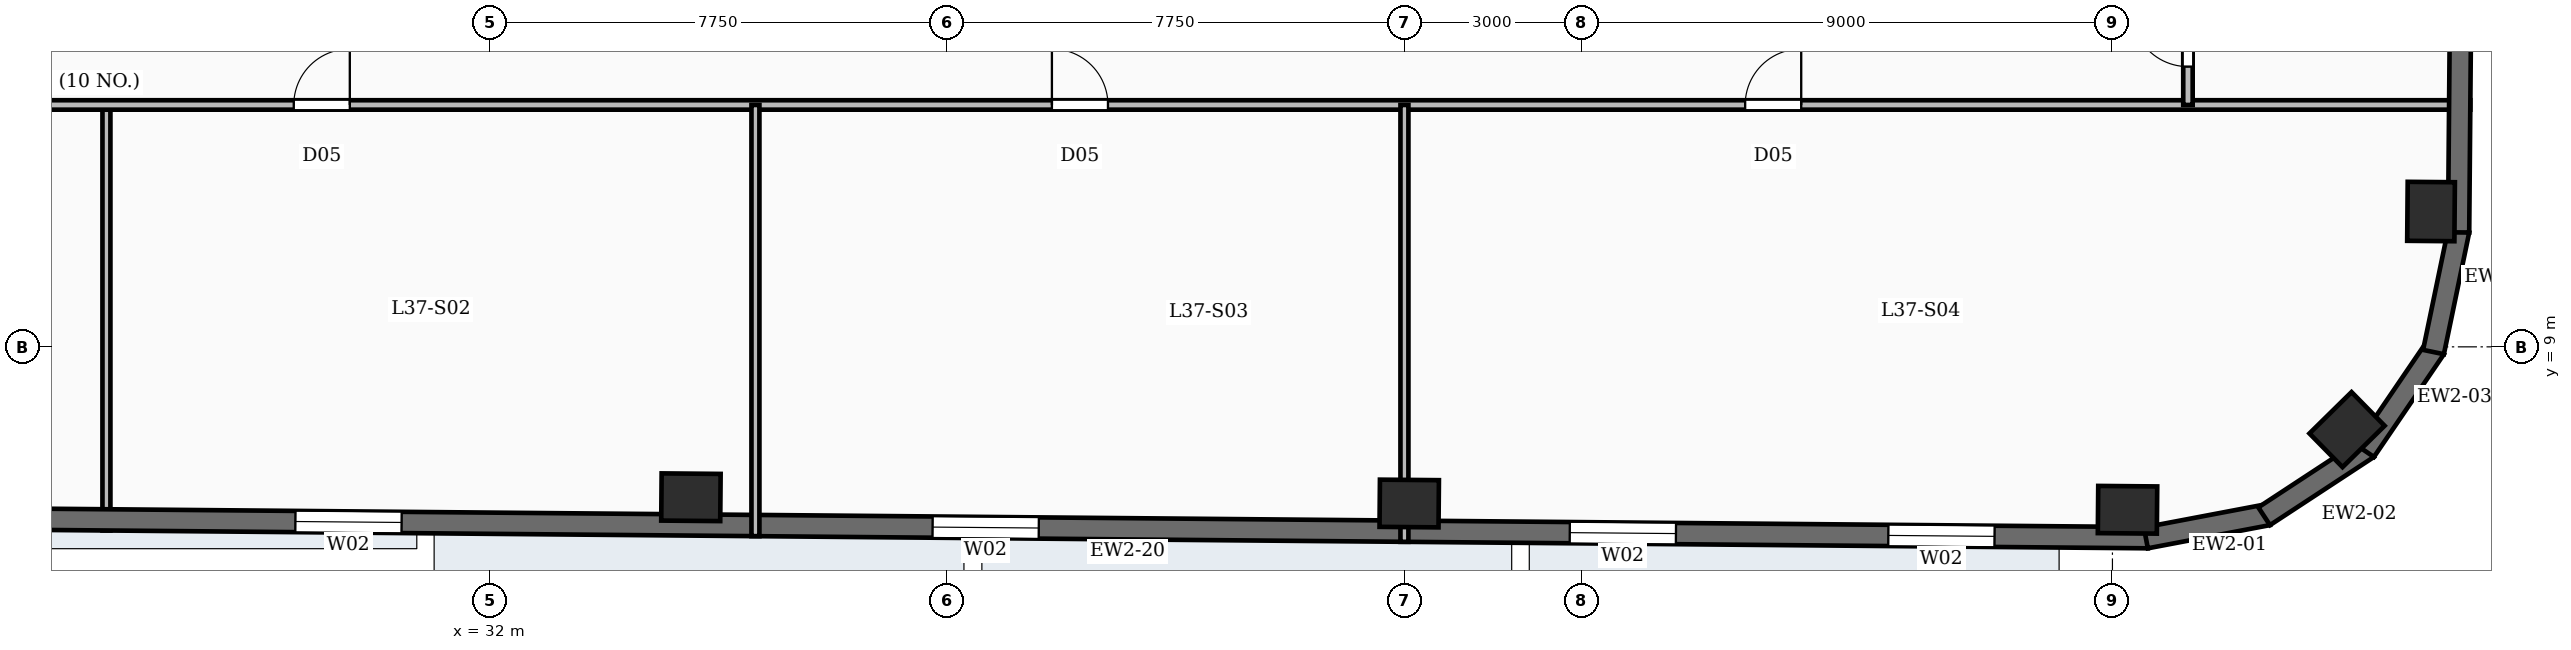
"""IFC4 building model, lengths in metres.
Left out: names, types, materials, properties, quantities, classifications, styles, units other than length and angle.
Written with IfcOpenShell. Run it as: python <this file> out.ifc"""

import sys

from ifc_helpers import new_model, si_unit, direction, frame, frame_2d, origin, origin_2d, place, context, subcontext, project, spatial, rectangle, extrude, element, fill, save


model = new_model("IFC4")
c1 = context("Model", 3, precision=1e-05, world=origin(), true_north=direction((0.0, 1.0)))
c2 = subcontext(c1, "Body", "Model", "MODEL_VIEW")
j1 = project(units=[si_unit("LENGTHUNIT", "METRE"), si_unit("PLANEANGLEUNIT", "RADIAN")], contexts=[c1])
p1 = place(None, origin())
s1 = spatial("IfcSite", under=j1, at=p1, CompositionType="ELEMENT")
p2 = place(p1, origin())
s2 = spatial("IfcBuilding", under=s1, at=p2, CompositionType="ELEMENT")
p3 = place(p2, frame((0.0, 0.0, 158.45)))
s3 = spatial("IfcBuildingStorey", under=s2, at=p3, CompositionType="ELEMENT", Elevation=158.45)
for number, where, z_axis, x_axis in (
    (1, (35.407, 6.451, -0.45), (0.0, 0.0, 1.0), (1.0, -0.009, 0.0)),
    (2, (47.581, 6.344, -0.45), (0.0, 0.0, 1.0), (1.0, -0.009, 0.0)),
    (3, (59.756, 6.238, -0.45), (0.0, 0.0, 1.0), (1.0, -0.009, 0.0)),
    (4, (63.477, 7.597, -0.45), (0.0, 0.0, 1.0), (0.713, 0.701, 0.0)),
    (5, (64.9, 11.294, -0.45), (0.0, 0.0, 1.0), (0.009, 1.0, 0.0)),
):
    element("IfcColumn", number, at=place(p3, frame(where, z_axis=z_axis, x_axis=x_axis)), inside=s3, PredefinedType="COLUMN", context=c2, shape_type="SweptSolid", body=[
        extrude(rectangle(XDim=1.0, YDim=0.8, at=origin_2d()), origin(), (0.0, 0.0, 1.0), 3.93),
    ])
p4 = place(p3, frame((62.136, 6.155, 0.0), z_axis=(0.0, 0.0, 1.0), x_axis=(-0.98246713518, -0.186435855703, 0.0)))
e6 = element("IfcWall", 6, at=p4, inside=s3, PredefinedType="SOLIDWALL", context=c2, shape_type="SweptSolid", body=[
    extrude(rectangle(XDim=2.107, YDim=0.36, at=frame_2d((1.053, 0.0))), origin(), (0.0, 0.0, 1.0), 3.48),
])
p5 = place(p3, frame((63.833, 7.284, 0.0), z_axis=(0.0, 0.0, 1.0), x_axis=(-0.836303589916, -0.548266637224, 0.0)))
e7 = element("IfcWall", 7, at=p5, inside=s3, PredefinedType="SOLIDWALL", context=c2, shape_type="SweptSolid", body=[
    extrude(rectangle(XDim=2.107, YDim=0.36, at=frame_2d((1.054, 0.0))), origin(), (0.0, 0.0, 1.0), 3.48),
])
for number, where, z_axis, x_axis in (
    (8, (64.969, 8.977, 0.0), (0.0, 0.0, 1.0), (-0.563, -0.827, 0.0)),
    (9, (65.371, 10.975, 0.0), (0.0, 0.0, 1.0), (-0.204, -0.979, 0.0)),
):
    element("IfcWall", number, at=place(p3, frame(where, z_axis=z_axis, x_axis=x_axis)), inside=s3, PredefinedType="SOLIDWALL", context=c2, shape_type="SweptSolid", body=[
        extrude(rectangle(XDim=2.107, YDim=0.36, at=frame_2d((1.053, 0.0))), origin(), (0.0, 0.0, 1.0), 3.48),
    ])
p6 = place(p3, frame((65.671, 45.738, 0.0), z_axis=(0.0, 0.0, 1.0), x_axis=(-0.008727348535, -0.999961915969, 0.0)))
e10 = element("IfcWall", 10, at=p6, inside=s3, PredefinedType="SOLIDWALL", context=c2, shape_type="SweptSolid", body=[
    extrude(rectangle(XDim=34.8, YDim=0.36, at=frame_2d((17.4, 0.0))), origin(), (0.0, 0.0, 1.0), 3.48),
])
p7 = place(p6, frame((4.2, 0.0, 0.88)))
e11 = element("IfcOpeningElement", 11, at=p7, cuts=e10, PredefinedType="OPENING", context=c2, shape_type="SweptSolid", body=[
    extrude(rectangle(XDim=1.35, YDim=2.2, at=frame_2d((0.675, 1.1))), frame((0.0, 0.19, 0.0), z_axis=(0.0, -1.0, 0.0), x_axis=(1.0, 0.0, 0.0)), (0.0, 0.0, 1.0), 0.38),
])
p8 = place(p6, frame((15.4, 0.0, 0.88)))
e12 = element("IfcOpeningElement", 12, at=p8, cuts=e10, PredefinedType="OPENING", context=c2, shape_type="SweptSolid", body=[
    extrude(rectangle(XDim=1.35, YDim=2.2, at=frame_2d((0.675, 1.1))), frame((0.0, 0.19, 0.0), z_axis=(0.0, -1.0, 0.0), x_axis=(1.0, 0.0, 0.0)), (0.0, 0.0, 1.0), 0.38),
])
p9 = place(p6, frame((26.6, 0.0, 0.88)))
e13 = element("IfcOpeningElement", 13, at=p9, cuts=e10, PredefinedType="OPENING", context=c2, shape_type="SweptSolid", body=[
    extrude(rectangle(XDim=1.35, YDim=2.2, at=frame_2d((0.675, 1.1))), frame((0.0, 0.19, 0.0), z_axis=(0.0, -1.0, 0.0), x_axis=(1.0, 0.0, 0.0)), (0.0, 0.0, 1.0), 0.38),
])
p10 = place(p3, frame((60.102, 5.765, 0.0), z_axis=(0.0, 0.0, 1.0), x_axis=(-0.999961955436, 0.008722825272, 0.0)))
e14 = element("IfcWall", 14, at=p10, inside=s3, PredefinedType="SOLIDWALL", context=c2, shape_type="SweptSolid", body=[
    extrude(rectangle(XDim=49.4, YDim=0.36, at=frame_2d((24.7, 0.0))), origin(), (0.0, 0.0, 1.0), 3.48),
])
p11 = place(p10, frame((2.6, 0.0, 0.88)))
e15 = element("IfcOpeningElement", 15, at=p11, cuts=e14, PredefinedType="OPENING", context=c2, shape_type="SweptSolid", body=[
    extrude(rectangle(XDim=1.8, YDim=2.15, at=frame_2d((0.9, 1.075))), frame((0.0, 0.19, 0.0), z_axis=(0.0, -1.0, 0.0), x_axis=(1.0, 0.0, 0.0)), (0.0, 0.0, 1.0), 0.38),
])
p12 = place(p10, frame((8.0, 0.0, 0.88)))
e16 = element("IfcOpeningElement", 16, at=p12, cuts=e14, PredefinedType="OPENING", context=c2, shape_type="SweptSolid", body=[
    extrude(rectangle(XDim=1.8, YDim=2.15, at=frame_2d((0.9, 1.075))), frame((0.0, 0.19, 0.0), z_axis=(0.0, -1.0, 0.0), x_axis=(1.0, 0.0, 0.0)), (0.0, 0.0, 1.0), 0.38),
])
p13 = place(p10, frame((18.8, 0.0, 0.88)))
e17 = element("IfcOpeningElement", 17, at=p13, cuts=e14, PredefinedType="OPENING", context=c2, shape_type="SweptSolid", body=[
    extrude(rectangle(XDim=1.8, YDim=2.15, at=frame_2d((0.9, 1.075))), frame((0.0, 0.19, 0.0), z_axis=(0.0, -1.0, 0.0), x_axis=(1.0, 0.0, 0.0)), (0.0, 0.0, 1.0), 0.38),
])
p14 = place(p10, frame((29.6, 0.0, 0.88)))
e18 = element("IfcOpeningElement", 18, at=p14, cuts=e14, PredefinedType="OPENING", context=c2, shape_type="SweptSolid", body=[
    extrude(rectangle(XDim=1.8, YDim=2.15, at=frame_2d((0.9, 1.075))), frame((0.0, 0.19, 0.0), z_axis=(0.0, -1.0, 0.0), x_axis=(1.0, 0.0, 0.0)), (0.0, 0.0, 1.0), 0.38),
])
p15 = place(p10, frame((40.4, 0.0, 0.88)))
e19 = element("IfcOpeningElement", 19, at=p15, cuts=e14, PredefinedType="OPENING", context=c2, shape_type="SweptSolid", body=[
    extrude(rectangle(XDim=1.8, YDim=2.15, at=frame_2d((0.9, 1.075))), frame((0.0, 0.19, 0.0), z_axis=(0.0, -1.0, 0.0), x_axis=(1.0, 0.0, 0.0)), (0.0, 0.0, 1.0), 0.38),
])
p16 = place(p3, frame((25.5, 5.887, 0.0), z_axis=(0.0, 0.0, 1.0), x_axis=(0.0, 1.0, 0.0)))
e20 = element("IfcWall", 20, at=p16, inside=s3, PredefinedType="PARTITIONING", context=c2, shape_type="SweptSolid", body=[
    extrude(rectangle(XDim=7.213, YDim=0.135, at=frame_2d((3.606, 0.0))), origin(), (0.0, 0.0, 1.0), 2.54),
])
p17 = place(p3, frame((36.5, 5.791, 0.0), z_axis=(0.0, 0.0, 1.0), x_axis=(0.0, 1.0, 0.0)))
e21 = element("IfcWall", 21, at=p17, inside=s3, PredefinedType="PARTITIONING", context=c2, shape_type="SweptSolid", body=[
    extrude(rectangle(XDim=7.309, YDim=0.135, at=frame_2d((3.654, 0.0))), origin(), (0.0, 0.0, 1.0), 2.54),
])
p18 = place(p3, frame((47.5, 5.695, 0.0), z_axis=(0.0, 0.0, 1.0), x_axis=(0.0, 1.0, 0.0)))
e22 = element("IfcWall", 22, at=p18, inside=s3, PredefinedType="PARTITIONING", context=c2, shape_type="SweptSolid", body=[
    extrude(rectangle(XDim=7.405, YDim=0.135, at=frame_2d((3.702, 0.0))), origin(), (0.0, 0.0, 1.0), 2.54),
])
p19 = place(p3, frame((5.364, 13.1, 0.0), z_axis=(0.0, 0.0, 1.0), x_axis=(1.0, 0.0, 0.0)))
e23 = element("IfcWall", 23, at=p19, inside=s3, PredefinedType="PARTITIONING", context=c2, shape_type="SweptSolid", body=[
    extrude(rectangle(XDim=60.202, YDim=0.16, at=frame_2d((30.101, 0.0))), origin(), (0.0, 0.0, 1.0), 2.54),
])
p20 = place(p19, frame((14.361, 0.0, 0.0)))
e24 = element("IfcOpeningElement", 24, at=p20, cuts=e23, PredefinedType="OPENING", context=c2, shape_type="SweptSolid", body=[
    extrude(rectangle(XDim=0.95, YDim=2.15, at=frame_2d((0.475, 1.075))), frame((0.0, 0.09, 0.0), z_axis=(0.0, -1.0, 0.0), x_axis=(1.0, 0.0, 0.0)), (0.0, 0.0, 1.0), 0.18),
])
p21 = place(p19, frame((23.311, 0.0, 0.0)))
e25 = element("IfcOpeningElement", 25, at=p21, cuts=e23, PredefinedType="OPENING", context=c2, shape_type="SweptSolid", body=[
    extrude(rectangle(XDim=0.95, YDim=2.15, at=frame_2d((0.475, 1.075))), frame((0.0, 0.09, 0.0), z_axis=(0.0, -1.0, 0.0), x_axis=(1.0, 0.0, 0.0)), (0.0, 0.0, 1.0), 0.18),
])
p22 = place(p19, frame((36.161, 0.0, 0.0)))
e26 = element("IfcOpeningElement", 26, at=p22, cuts=e23, PredefinedType="OPENING", context=c2, shape_type="SweptSolid", body=[
    extrude(rectangle(XDim=0.95, YDim=2.15, at=frame_2d((0.475, 1.075))), frame((0.0, 0.09, 0.0), z_axis=(0.0, -1.0, 0.0), x_axis=(1.0, 0.0, 0.0)), (0.0, 0.0, 1.0), 0.18),
])
p23 = place(p19, frame((47.911, 0.0, 0.0)))
e27 = element("IfcOpeningElement", 27, at=p23, cuts=e23, PredefinedType="OPENING", context=c2, shape_type="SweptSolid", body=[
    extrude(rectangle(XDim=0.95, YDim=2.15, at=frame_2d((0.475, 1.075))), frame((0.0, 0.09, 0.0), z_axis=(0.0, -1.0, 0.0), x_axis=(1.0, 0.0, 0.0)), (0.0, 0.0, 1.0), 0.18),
])
p24 = place(p3, frame((60.78, 13.1, 0.0), z_axis=(0.0, 0.0, 1.0), x_axis=(0.0, 1.0, 0.0)))
e28 = element("IfcWall", 28, at=p24, inside=s3, PredefinedType="PARTITIONING", context=c2, shape_type="SweptSolid", body=[
    extrude(rectangle(XDim=2.3, YDim=0.16, at=frame_2d((1.15, 0.0))), origin(), (0.0, 0.0, 1.0), 2.54),
])
p25 = place(p24, frame((0.65, 0.0, 0.0)))
e29 = element("IfcOpeningElement", 29, at=p25, cuts=e28, PredefinedType="OPENING", context=c2, shape_type="SweptSolid", body=[
    extrude(rectangle(XDim=0.95, YDim=2.15, at=frame_2d((0.475, 1.075))), frame((0.0, 0.09, 0.0), z_axis=(0.0, -1.0, 0.0), x_axis=(1.0, 0.0, 0.0)), (0.0, 0.0, 1.0), 0.18),
])
p26 = place(p11, origin())
e30 = element("IfcWindow", 30, at=p26, inside=s3, PartitioningType="DOUBLE_PANEL_VERTICAL", PredefinedType="WINDOW", context=c2, shape_type="SweptSolid", body=[
    extrude(rectangle(XDim=1.8, YDim=2.15, at=frame_2d((0.9, 1.075))), frame((0.0, 0.03, 0.0), z_axis=(0.0, -1.0, 0.0), x_axis=(1.0, 0.0, 0.0)), (0.0, 0.0, 1.0), 0.06),
])
fill(e15, e30)
p27 = place(p12, origin())
e31 = element("IfcWindow", 31, at=p27, inside=s3, PartitioningType="DOUBLE_PANEL_VERTICAL", PredefinedType="WINDOW", context=c2, shape_type="SweptSolid", body=[
    extrude(rectangle(XDim=1.8, YDim=2.15, at=frame_2d((0.9, 1.075))), frame((0.0, 0.03, 0.0), z_axis=(0.0, -1.0, 0.0), x_axis=(1.0, 0.0, 0.0)), (0.0, 0.0, 1.0), 0.06),
])
fill(e16, e31)
p28 = place(p13, origin())
e32 = element("IfcWindow", 32, at=p28, inside=s3, PartitioningType="DOUBLE_PANEL_VERTICAL", PredefinedType="WINDOW", context=c2, shape_type="SweptSolid", body=[
    extrude(rectangle(XDim=1.8, YDim=2.15, at=frame_2d((0.9, 1.075))), frame((0.0, 0.03, 0.0), z_axis=(0.0, -1.0, 0.0), x_axis=(1.0, 0.0, 0.0)), (0.0, 0.0, 1.0), 0.06),
])
fill(e17, e32)
p29 = place(p14, origin())
e33 = element("IfcWindow", 33, at=p29, inside=s3, PartitioningType="DOUBLE_PANEL_VERTICAL", PredefinedType="WINDOW", context=c2, shape_type="SweptSolid", body=[
    extrude(rectangle(XDim=1.8, YDim=2.15, at=frame_2d((0.9, 1.075))), frame((0.0, 0.03, 0.0), z_axis=(0.0, -1.0, 0.0), x_axis=(1.0, 0.0, 0.0)), (0.0, 0.0, 1.0), 0.06),
])
fill(e18, e33)
p30 = place(p21, origin())
e34 = element("IfcDoor", 34, at=p30, inside=s3, OperationType="SINGLE_SWING_RIGHT", PredefinedType="DOOR", context=c2, shape_type="SweptSolid", body=[
    extrude(rectangle(XDim=0.95, YDim=2.15, at=frame_2d((0.475, 1.075))), frame((0.0, 0.025, 0.0), z_axis=(0.0, -1.0, 0.0), x_axis=(1.0, 0.0, 0.0)), (0.0, 0.0, 1.0), 0.05),
])
fill(e25, e34)
p31 = place(p22, origin())
e35 = element("IfcDoor", 35, at=p31, inside=s3, OperationType="SINGLE_SWING_LEFT", PredefinedType="DOOR", context=c2, shape_type="SweptSolid", body=[
    extrude(rectangle(XDim=0.95, YDim=2.15, at=frame_2d((0.475, 1.075))), frame((0.0, 0.025, 0.0), z_axis=(0.0, -1.0, 0.0), x_axis=(1.0, 0.0, 0.0)), (0.0, 0.0, 1.0), 0.05),
])
fill(e26, e35)
p32 = place(p23, origin())
e36 = element("IfcDoor", 36, at=p32, inside=s3, OperationType="SINGLE_SWING_RIGHT", PredefinedType="DOOR", context=c2, shape_type="SweptSolid", body=[
    extrude(rectangle(XDim=0.95, YDim=2.15, at=frame_2d((0.475, 1.075))), frame((0.0, 0.025, 0.0), z_axis=(0.0, -1.0, 0.0), x_axis=(1.0, 0.0, 0.0)), (0.0, 0.0, 1.0), 0.05),
])
fill(e27, e36)
p33 = place(p25, origin())
e37 = element("IfcDoor", 37, at=p33, inside=s3, OperationType="SINGLE_SWING_RIGHT", PredefinedType="DOOR", context=c2, shape_type="SweptSolid", body=[
    extrude(rectangle(XDim=0.95, YDim=2.15, at=frame_2d((0.475, 1.075))), frame((0.0, 0.025, 0.0), z_axis=(0.0, -1.0, 0.0), x_axis=(1.0, 0.0, 0.0)), (0.0, 0.0, 1.0), 0.05),
])
fill(e29, e37)
save(model, sys.argv[1])
